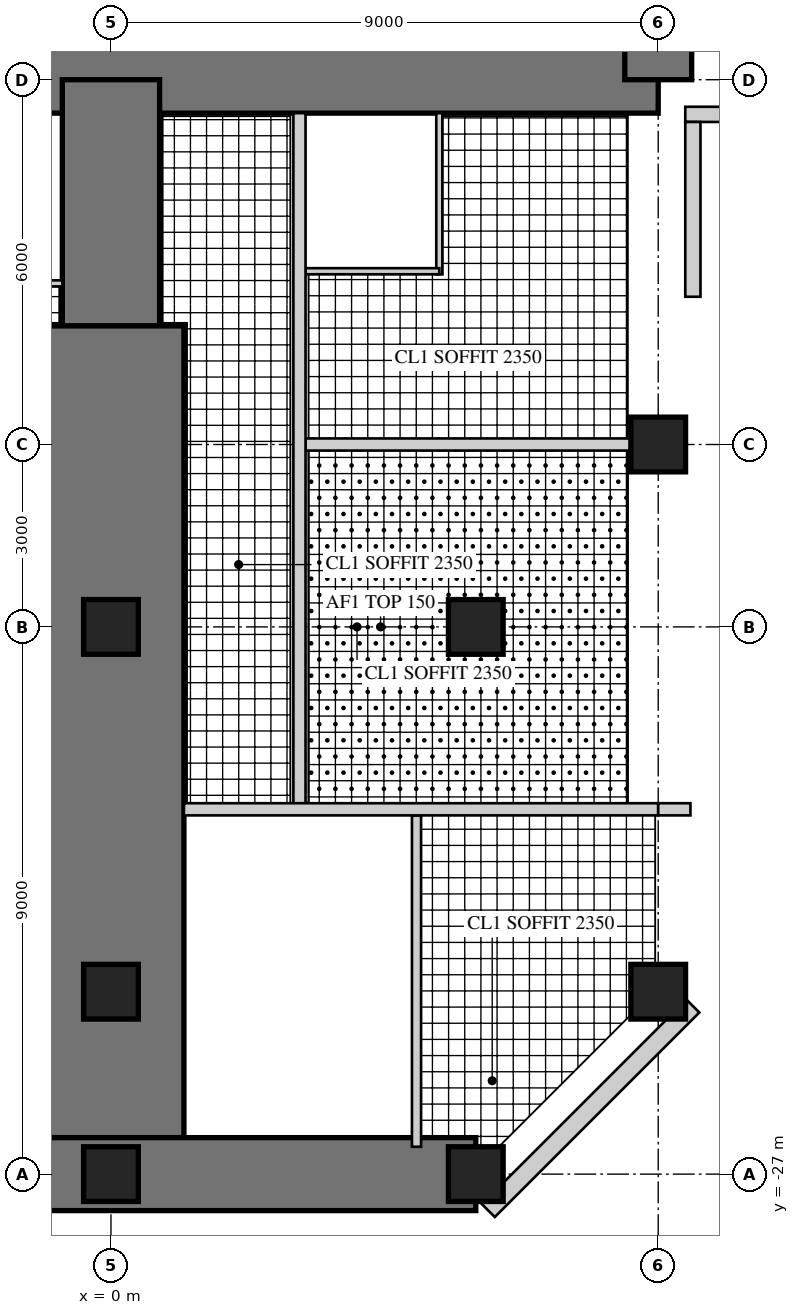
"""IFC4 building model, lengths in metres.
Left out: names, types, materials, properties, quantities, classifications, styles, units other than length and angle.
Written with IfcOpenShell. Run it as: python <this file> out.ifc"""

import sys

from ifc_helpers import new_model, si_unit, direction, frame, frame_2d, origin, origin_2d, place, context, subcontext, project, spatial, rectangle, hollow_rectangle, extrude, element, fill, save


model = new_model("IFC4")
c1 = context("Model", 3, precision=1e-05, world=origin(), true_north=direction((0.0, 1.0)))
c2 = subcontext(c1, "Body", "Model", "MODEL_VIEW")
j1 = project(units=[si_unit("LENGTHUNIT", "METRE"), si_unit("PLANEANGLEUNIT", "RADIAN")], contexts=[c1])
p1 = place(None, origin())
s1 = spatial("IfcSite", under=j1, at=p1, CompositionType="ELEMENT")
p2 = place(p1, origin())
s2 = spatial("IfcBuilding", under=s1, at=p2, CompositionType="ELEMENT")
p3 = place(p2, frame((0.0, 0.0, 206.9)))
s3 = spatial("IfcBuildingStorey", under=s2, at=p3, CompositionType="ELEMENT", Elevation=206.9)
p4 = place(p3, frame((-9.0, -9.0, 0.0), z_axis=(0.0, 0.0, 1.0), x_axis=(1.0, 0.0, 0.0)))
e1 = element("IfcWall", 1, at=p4, inside=s3, PredefinedType="SHEAR", context=c2, shape_type="SweptSolid", body=[
    extrude(rectangle(XDim=18.0, YDim=1.1, at=frame_2d((9.0, 0.0))), origin(), (0.0, 0.0, 1.0), 3.4),
])
p5 = place(p4, frame((9.8, 0.0, 0.0)))
e2 = element("IfcOpeningElement", 2, at=p5, cuts=e1, PredefinedType="OPENING", context=c2, shape_type="SweptSolid", body=[
    extrude(rectangle(XDim=1.0, YDim=2.4, at=frame_2d((0.5, 1.2))), frame((0.0, 0.56, 0.0), z_axis=(0.0, -1.0, 0.0), x_axis=(1.0, 0.0, 0.0)), (0.0, 0.0, 1.0), 1.12),
])
p6 = place(p3, frame((9.0, -9.0, 0.0), z_axis=(0.0, 0.0, 1.0), x_axis=(0.0, 1.0, 0.0)))
e3 = element("IfcWall", 3, at=p6, inside=s3, PredefinedType="SHEAR", context=c2, shape_type="SweptSolid", body=[
    extrude(rectangle(XDim=18.0, YDim=1.1, at=frame_2d((9.0, 0.0))), origin(), (0.0, 0.0, 1.0), 3.4),
])
p7 = place(p6, frame((9.8, 0.0, 0.0)))
e4 = element("IfcOpeningElement", 4, at=p7, cuts=e3, PredefinedType="OPENING", context=c2, shape_type="SweptSolid", body=[
    extrude(rectangle(XDim=1.0, YDim=2.4, at=frame_2d((0.5, 1.2))), frame((0.0, 0.56, 0.0), z_axis=(0.0, -1.0, 0.0), x_axis=(1.0, 0.0, 0.0)), (0.0, 0.0, 1.0), 1.12),
])
p8 = place(p3, frame((0.0, -9.0, 0.0), z_axis=(0.0, 0.0, 1.0), x_axis=(0.0, -1.0, 0.0)))
e5 = element("IfcWall", 5, at=p8, inside=s3, PredefinedType="SHEAR", context=c2, shape_type="SweptSolid", body=[
    extrude(rectangle(XDim=4.05, YDim=1.6, at=frame_2d((2.025, 0.0))), origin(), (0.0, 0.0, 1.0), 3.4),
])
p9 = place(p3, frame((0.0, -13.05, 0.0), z_axis=(0.0, 0.0, 1.0), x_axis=(0.0, -1.0, 0.0)))
e6 = element("IfcWall", 6, at=p9, inside=s3, PredefinedType="SHEAR", context=c2, shape_type="SweptSolid", body=[
    extrude(rectangle(XDim=13.95, YDim=2.4, at=frame_2d((6.975, 0.0))), origin(), (0.0, 0.0, 1.0), 3.4),
])
p10 = place(p9, frame((0.3, 0.0, 0.0)))
e7 = element("IfcOpeningElement", 7, at=p10, cuts=e6, PredefinedType="OPENING", context=c2, shape_type="SweptSolid", body=[
    extrude(rectangle(XDim=1.0, YDim=2.15, at=frame_2d((0.5, 1.075))), frame((0.0, 1.21, 0.0), z_axis=(0.0, -1.0, 0.0), x_axis=(1.0, 0.0, 0.0)), (0.0, 0.0, 1.0), 2.42),
])
p11 = place(p9, frame((2.55, 0.0, 0.0)))
e8 = element("IfcOpeningElement", 8, at=p11, cuts=e6, PredefinedType="OPENING", context=c2, shape_type="SweptSolid", body=[
    extrude(rectangle(XDim=1.0, YDim=2.15, at=frame_2d((0.5, 1.075))), frame((0.0, 1.21, 0.0), z_axis=(0.0, -1.0, 0.0), x_axis=(1.0, 0.0, 0.0)), (0.0, 0.0, 1.0), 2.42),
])
p12 = place(p9, frame((9.2, 0.0, 0.0)))
e9 = element("IfcOpeningElement", 9, at=p12, cuts=e6, PredefinedType="OPENING", context=c2, shape_type="SweptSolid", body=[
    extrude(rectangle(XDim=1.0, YDim=2.2, at=frame_2d((0.5, 1.1))), frame((0.0, 1.21, 0.0), z_axis=(0.0, -1.0, 0.0), x_axis=(1.0, 0.0, 0.0)), (0.0, 0.0, 1.0), 2.42),
])
p13 = place(p3, frame((-6.0, -27.0, 0.0), z_axis=(0.0, 0.0, 1.0), x_axis=(1.0, 0.0, 0.0)))
e10 = element("IfcWall", 10, at=p13, inside=s3, PredefinedType="SHEAR", context=c2, shape_type="SweptSolid", body=[
    extrude(rectangle(XDim=12.0, YDim=1.2, at=frame_2d((6.0, 0.0))), origin(), (0.0, 0.0, 1.0), 3.4),
])
p14 = place(p13, frame((1.225, 0.0, 0.6)))
e11 = element("IfcOpeningElement", 11, at=p14, cuts=e10, PredefinedType="OPENING", context=c2, shape_type="SweptSolid", body=[
    extrude(rectangle(XDim=3.0, YDim=2.4, at=frame_2d((1.5, 1.2))), frame((0.0, 0.61, 0.0), z_axis=(0.0, -1.0, 0.0), x_axis=(1.0, 0.0, 0.0)), (0.0, 0.0, 1.0), 1.22),
])
p15 = place(p13, frame((7.775, 0.0, 0.6)))
e12 = element("IfcOpeningElement", 12, at=p15, cuts=e10, PredefinedType="OPENING", context=c2, shape_type="SweptSolid", body=[
    extrude(rectangle(XDim=3.0, YDim=2.4, at=frame_2d((1.5, 1.2))), frame((0.0, 0.61, 0.0), z_axis=(0.0, -1.0, 0.0), x_axis=(1.0, 0.0, 0.0)), (0.0, 0.0, 1.0), 1.22),
])
for number, where, z_axis, x_axis in (
    (13, (9.0, -15.0, 0.0), (0.0, 0.0, 1.0), (1.0, 0.0, 0.0)),
    (14, (9.0, -24.0, 0.0), (0.0, 0.0, 1.0), (1.0, 0.0, 0.0)),
    (15, (0.0, -27.0, 0.0), (0.0, 0.0, 1.0), (1.0, 0.0, 0.0)),
    (16, (6.0, -27.0, 0.0), (0.0, 0.0, 1.0), (1.0, 0.0, 0.0)),
    (17, (0.0, -18.0, 0.0), (0.0, 0.0, 1.0), (1.0, 0.0, 0.0)),
    (18, (6.0, -18.0, 0.0), (0.0, 0.0, 1.0), (1.0, 0.0, 0.0)),
    (19, (0.0, -24.0, 0.0), (0.0, 0.0, 1.0), (1.0, 0.0, 0.0)),
):
    element("IfcColumn", number, at=place(p3, frame(where, z_axis=z_axis, x_axis=x_axis)), inside=s3, PredefinedType="COLUMN", context=c2, shape_type="SweptSolid", body=[
        extrude(rectangle(XDim=0.9, YDim=0.9, at=origin_2d()), origin(), (0.0, 0.0, 1.0), 3.4),
    ])
p16 = place(p3, frame((9.445, -9.57, 0.0), z_axis=(0.0, 0.0, 1.0), x_axis=(1.0, 0.0, 0.0)))
e20 = element("IfcWall", 20, at=p16, inside=s3, PredefinedType="SOLIDWALL", context=c2, shape_type="SweptSolid", body=[
    extrude(rectangle(XDim=3.125, YDim=0.25, at=frame_2d((1.562, 0.0))), origin(), (0.0, 0.0, 1.0), 3.22),
])
p17 = place(p16, frame((0.6, 0.0, 0.0)))
e21 = element("IfcOpeningElement", 21, at=p17, cuts=e20, PredefinedType="OPENING", context=c2, shape_type="SweptSolid", body=[
    extrude(rectangle(XDim=1.0, YDim=2.2, at=frame_2d((0.5, 1.1))), frame((0.0, 0.135, 0.0), z_axis=(0.0, -1.0, 0.0), x_axis=(1.0, 0.0, 0.0)), (0.0, 0.0, 1.0), 0.27),
])
p18 = place(p3, frame((6.206, -27.6, 0.0), z_axis=(0.0, 0.0, 1.0), x_axis=(0.707106781187, 0.707106781187, 0.0)))
e22 = element("IfcWall", 22, at=p18, inside=s3, PredefinedType="SOLIDWALL", context=c2, shape_type="SweptSolid", body=[
    extrude(rectangle(XDim=4.757, YDim=0.3, at=frame_2d((2.379, 0.0))), origin(), (0.0, 0.0, 1.0), 3.22),
])
p19 = place(p18, frame((1.929, 0.0, 0.3)))
e23 = element("IfcOpeningElement", 23, at=p19, cuts=e22, PredefinedType="OPENING", context=c2, shape_type="SweptSolid", body=[
    extrude(rectangle(XDim=0.9, YDim=2.4, at=frame_2d((0.45, 1.2))), frame((0.0, 0.16, 0.0), z_axis=(0.0, -1.0, 0.0), x_axis=(1.0, 0.0, 0.0)), (0.0, 0.0, 1.0), 0.32),
])
p20 = place(p3, frame((9.57, -12.57, 0.0), z_axis=(0.0, 0.0, 1.0), x_axis=(0.0, 1.0, 0.0)))
e24 = element("IfcWall", 24, at=p20, inside=s3, PredefinedType="SOLIDWALL", context=c2, shape_type="SweptSolid", body=[
    extrude(rectangle(XDim=2.875, YDim=0.25, at=frame_2d((1.438, 0.0))), origin(), (0.0, 0.0, 1.0), 3.22),
])
p21 = place(p20, frame((0.6, 0.0, 0.0)))
e25 = element("IfcOpeningElement", 25, at=p21, cuts=e24, PredefinedType="OPENING", context=c2, shape_type="SweptSolid", body=[
    extrude(rectangle(XDim=1.0, YDim=2.2, at=frame_2d((0.5, 1.1))), frame((0.0, 0.135, 0.0), z_axis=(0.0, -1.0, 0.0), x_axis=(1.0, 0.0, 0.0)), (0.0, 0.0, 1.0), 0.27),
])
p22 = place(p3, frame((5.4, -9.55, 0.0), z_axis=(0.0, 0.0, 1.0), x_axis=(0.0, -1.0, 0.0)))
e26 = element("IfcWall", 26, at=p22, inside=s3, PredefinedType="PARTITIONING", context=c2, shape_type="SweptSolid", body=[
    extrude(rectangle(XDim=2.65, YDim=0.1, at=frame_2d((1.325, 0.0))), origin(), (0.0, 0.0, 1.0), 3.22),
])
p23 = place(p3, frame((3.2, -12.15, 0.0), z_axis=(0.0, 0.0, 1.0), x_axis=(1.0, 0.0, 0.0)))
e27 = element("IfcWall", 27, at=p23, inside=s3, PredefinedType="PARTITIONING", context=c2, shape_type="SweptSolid", body=[
    extrude(rectangle(XDim=2.2, YDim=0.1, at=frame_2d((1.1, 0.0))), origin(), (0.0, 0.0, 1.0), 3.22),
])
p24 = place(p23, frame((0.55, 0.0, 0.0)))
e28 = element("IfcOpeningElement", 28, at=p24, cuts=e27, PredefinedType="OPENING", context=c2, shape_type="SweptSolid", body=[
    extrude(rectangle(XDim=0.9, YDim=2.1, at=frame_2d((0.45, 1.05))), frame((0.0, 0.06, 0.0), z_axis=(0.0, -1.0, 0.0), x_axis=(1.0, 0.0, 0.0)), (0.0, 0.0, 1.0), 0.12),
])
p25 = place(p3, frame((-3.8, -12.35, 0.0), z_axis=(0.0, 0.0, 1.0), x_axis=(1.0, 0.0, 0.0)))
e29 = element("IfcWall", 29, at=p25, inside=s3, PredefinedType="PARTITIONING", context=c2, shape_type="SweptSolid", body=[
    extrude(rectangle(XDim=3.0, YDim=0.1, at=frame_2d((1.5, 0.0))), origin(), (0.0, 0.0, 1.0), 3.22),
])
p26 = place(p25, frame((0.55, 0.0, 0.0)))
e30 = element("IfcOpeningElement", 30, at=p26, cuts=e29, PredefinedType="OPENING", context=c2, shape_type="SweptSolid", body=[
    extrude(rectangle(XDim=0.9, YDim=2.1, at=frame_2d((0.45, 1.05))), frame((0.0, 0.06, 0.0), z_axis=(0.0, -1.0, 0.0), x_axis=(1.0, 0.0, 0.0)), (0.0, 0.0, 1.0), 0.12),
])
p27 = place(p3, frame((3.2, -15.0, 0.0), z_axis=(0.0, 0.0, 1.0), x_axis=(1.0, 0.0, 0.0)))
e31 = element("IfcWall", 31, at=p27, inside=s3, PredefinedType="SOLIDWALL", context=c2, shape_type="SweptSolid", body=[
    extrude(rectangle(XDim=5.35, YDim=0.2, at=frame_2d((2.675, 0.0))), origin(), (0.0, 0.0, 1.0), 2.47),
])
p28 = place(p3, frame((3.1, -9.55, 0.0), z_axis=(0.0, 0.0, 1.0), x_axis=(0.0, -1.0, 0.0)))
e32 = element("IfcWall", 32, at=p28, inside=s3, PredefinedType="SOLIDWALL", context=c2, shape_type="SweptSolid", body=[
    extrude(rectangle(XDim=11.45, YDim=0.2, at=frame_2d((5.725, 0.0))), origin(), (0.0, 0.0, 1.0), 3.22),
])
p29 = place(p28, frame((3.4, 0.0, 0.0)))
e33 = element("IfcOpeningElement", 33, at=p29, cuts=e32, PredefinedType="OPENING", context=c2, shape_type="SweptSolid", body=[
    extrude(rectangle(XDim=1.0, YDim=2.15, at=frame_2d((0.5, 1.075))), frame((0.0, 0.11, 0.0), z_axis=(0.0, -1.0, 0.0), x_axis=(1.0, 0.0, 0.0)), (0.0, 0.0, 1.0), 0.22),
])
p30 = place(p28, frame((6.65, 0.0, 0.0)))
e34 = element("IfcOpeningElement", 34, at=p30, cuts=e32, PredefinedType="OPENING", context=c2, shape_type="SweptSolid", body=[
    extrude(rectangle(XDim=1.0, YDim=2.2, at=frame_2d((0.5, 1.1))), frame((0.0, 0.11, 0.0), z_axis=(0.0, -1.0, 0.0), x_axis=(1.0, 0.0, 0.0)), (0.0, 0.0, 1.0), 0.22),
])
p31 = place(p3, frame((5.025, -21.1, 0.0), z_axis=(0.0, 0.0, 1.0), x_axis=(0.0, -1.0, 0.0)))
e35 = element("IfcWall", 35, at=p31, inside=s3, PredefinedType="PARTITIONING", context=c2, shape_type="SweptSolid", body=[
    extrude(rectangle(XDim=5.45, YDim=0.15, at=frame_2d((2.725, 0.0))), origin(), (0.0, 0.0, 1.0), 3.22),
])
p32 = place(p31, frame((0.6, 0.0, 0.0)))
e36 = element("IfcOpeningElement", 36, at=p32, cuts=e35, PredefinedType="OPENING", context=c2, shape_type="SweptSolid", body=[
    extrude(rectangle(XDim=1.0, YDim=2.1, at=frame_2d((0.5, 1.05))), frame((0.0, 0.085, 0.0), z_axis=(0.0, -1.0, 0.0), x_axis=(1.0, 0.0, 0.0)), (0.0, 0.0, 1.0), 0.17),
])
p33 = place(p3, frame((1.2, -21.0, 0.0), z_axis=(0.0, 0.0, 1.0), x_axis=(1.0, 0.0, 0.0)))
e37 = element("IfcWall", 37, at=p33, inside=s3, PredefinedType="SOLIDWALL", context=c2, shape_type="SweptSolid", body=[
    extrude(rectangle(XDim=7.8, YDim=0.2, at=frame_2d((3.9, 0.0))), origin(), (0.0, 0.0, 1.0), 2.62),
])
p34 = place(p33, frame((0.35, 0.0, 0.0)))
e38 = element("IfcOpeningElement", 38, at=p34, cuts=e37, PredefinedType="OPENING", context=c2, shape_type="SweptSolid", body=[
    extrude(rectangle(XDim=1.0, YDim=2.2, at=frame_2d((0.5, 1.1))), frame((0.0, 0.11, 0.0), z_axis=(0.0, -1.0, 0.0), x_axis=(1.0, 0.0, 0.0)), (0.0, 0.0, 1.0), 0.22),
])
p35 = place(p3, frame((9.0, -21.0, 0.0), z_axis=(0.0, 0.0, 1.0), x_axis=(1.0, 0.0, 0.0)))
e39 = element("IfcWall", 39, at=p35, inside=s3, PredefinedType="SOLIDWALL", context=c2, shape_type="SweptSolid", body=[
    extrude(rectangle(XDim=0.53, YDim=0.2, at=frame_2d((0.265, 0.0))), origin(), (0.0, 0.0, 1.0), 3.22),
])
p36 = place(p15, origin())
e40 = element("IfcWindow", 40, at=p36, inside=s3, PartitioningType="SINGLE_PANEL", PredefinedType="WINDOW", context=c2, shape_type="SweptSolid", body=[
    extrude(hollow_rectangle(XDim=3.0, YDim=2.4, WallThickness=0.06, at=frame_2d((1.5, 1.2))), frame((0.0, 0.03, 0.0), z_axis=(0.0, -1.0, 0.0), x_axis=(1.0, 0.0, 0.0)), (0.0, 0.0, 1.0), 0.06),
    extrude(rectangle(XDim=2.879, YDim=2.279, at=frame_2d((1.5, 1.2))), frame((0.0, 0.03, 0.0), z_axis=(0.0, -1.0, 0.0), x_axis=(1.0, 0.0, 0.0)), (0.0, 0.0, 1.0), 0.06),
])
fill(e12, e40)
p37 = place(p19, origin())
e41 = element("IfcWindow", 41, at=p37, inside=s3, PartitioningType="SINGLE_PANEL", PredefinedType="WINDOW", context=c2, shape_type="SweptSolid", body=[
    extrude(hollow_rectangle(XDim=0.9, YDim=2.4, WallThickness=0.06, at=frame_2d((0.45, 1.2))), frame((0.0, 0.03, 0.0), z_axis=(0.0, -1.0, 0.0), x_axis=(1.0, 0.0, 0.0)), (0.0, 0.0, 1.0), 0.06),
    extrude(rectangle(XDim=0.779, YDim=2.279, at=frame_2d((0.45, 1.2))), frame((0.0, 0.03, 0.0), z_axis=(0.0, -1.0, 0.0), x_axis=(1.0, 0.0, 0.0)), (0.0, 0.0, 1.0), 0.06),
])
fill(e23, e41)
p38 = place(p21, origin())
e42 = element("IfcDoor", 42, at=p38, inside=s3, OperationType="SINGLE_SWING_RIGHT", PredefinedType="DOOR", context=c2, shape_type="SweptSolid", body=[
    extrude(hollow_rectangle(XDim=1.0, YDim=2.2, WallThickness=0.06, at=frame_2d((0.5, 1.1))), frame((0.0, 0.025, 0.0), z_axis=(0.0, -1.0, 0.0), x_axis=(1.0, 0.0, 0.0)), (0.0, 0.0, 1.0), 0.05),
    extrude(rectangle(XDim=0.879, YDim=2.079, at=frame_2d((0.5, 1.1))), frame((0.0, 0.025, 0.0), z_axis=(0.0, -1.0, 0.0), x_axis=(1.0, 0.0, 0.0)), (0.0, 0.0, 1.0), 0.05),
])
fill(e25, e42)
p39 = place(p24, origin())
e43 = element("IfcDoor", 43, at=p39, inside=s3, OperationType="SINGLE_SWING_LEFT", PredefinedType="DOOR", context=c2, shape_type="SweptSolid", body=[
    extrude(rectangle(XDim=0.9, YDim=2.1, at=frame_2d((0.45, 1.05))), frame((0.0, 0.025, 0.0), z_axis=(0.0, -1.0, 0.0), x_axis=(1.0, 0.0, 0.0)), (0.0, 0.0, 1.0), 0.05),
])
fill(e28, e43)
p40 = place(p29, origin())
e44 = element("IfcDoor", 44, at=p40, inside=s3, OperationType="SINGLE_SWING_LEFT", PredefinedType="DOOR", context=c2, shape_type="SweptSolid", body=[
    extrude(rectangle(XDim=1.0, YDim=2.15, at=frame_2d((0.5, 1.075))), frame((0.0, 0.025, 0.0), z_axis=(0.0, -1.0, 0.0), x_axis=(1.0, 0.0, 0.0)), (0.0, 0.0, 1.0), 0.05),
])
fill(e33, e44)
p41 = place(p30, origin())
e45 = element("IfcDoor", 45, at=p41, inside=s3, OperationType="SINGLE_SWING_LEFT", PredefinedType="DOOR", context=c2, shape_type="SweptSolid", body=[
    extrude(rectangle(XDim=1.0, YDim=2.2, at=frame_2d((0.5, 1.1))), frame((0.0, 0.025, 0.0), z_axis=(0.0, -1.0, 0.0), x_axis=(1.0, 0.0, 0.0)), (0.0, 0.0, 1.0), 0.05),
])
fill(e34, e45)
p42 = place(p32, origin())
e46 = element("IfcDoor", 46, at=p42, inside=s3, OperationType="SINGLE_SWING_LEFT", PredefinedType="DOOR", context=c2, shape_type="SweptSolid", body=[
    extrude(rectangle(XDim=1.0, YDim=2.1, at=frame_2d((0.5, 1.05))), frame((0.0, 0.025, 0.0), z_axis=(0.0, -1.0, 0.0), x_axis=(1.0, 0.0, 0.0)), (0.0, 0.0, 1.0), 0.05),
])
fill(e36, e46)
p43 = place(p34, frame((1.0, 0.0, 0.0), z_axis=(0.0, 0.0, 1.0), x_axis=(-1.0, 0.0, 0.0)))
e47 = element("IfcDoor", 47, at=p43, inside=s3, OperationType="SINGLE_SWING_RIGHT", PredefinedType="DOOR", context=c2, shape_type="SweptSolid", body=[
    extrude(rectangle(XDim=1.0, YDim=2.2, at=frame_2d((0.5, 1.1))), frame((0.0, 0.025, 0.0), z_axis=(0.0, -1.0, 0.0), x_axis=(1.0, 0.0, 0.0)), (0.0, 0.0, 1.0), 0.05),
])
fill(e38, e47)
p44 = place(p10, frame((1.0, 0.0, 0.0), z_axis=(0.0, 0.0, 1.0), x_axis=(-1.0, 0.0, 0.0)))
e48 = element("IfcDoor", 48, at=p44, inside=s3, OperationType="SINGLE_SWING_LEFT", PredefinedType="DOOR", context=c2, shape_type="SweptSolid", body=[
    extrude(rectangle(XDim=1.0, YDim=2.15, at=frame_2d((0.5, 1.075))), frame((0.0, 0.025, 0.0), z_axis=(0.0, -1.0, 0.0), x_axis=(1.0, 0.0, 0.0)), (0.0, 0.0, 1.0), 0.05),
])
fill(e7, e48)
p45 = place(p11, frame((1.0, 0.0, 0.0), z_axis=(0.0, 0.0, 1.0), x_axis=(-1.0, 0.0, 0.0)))
e49 = element("IfcDoor", 49, at=p45, inside=s3, OperationType="SINGLE_SWING_RIGHT", PredefinedType="DOOR", context=c2, shape_type="SweptSolid", body=[
    extrude(rectangle(XDim=1.0, YDim=2.15, at=frame_2d((0.5, 1.075))), frame((0.0, 0.025, 0.0), z_axis=(0.0, -1.0, 0.0), x_axis=(1.0, 0.0, 0.0)), (0.0, 0.0, 1.0), 0.05),
])
fill(e8, e49)
p46 = place(p12, origin())
e50 = element("IfcDoor", 50, at=p46, inside=s3, OperationType="SINGLE_SWING_LEFT", PredefinedType="DOOR", context=c2, shape_type="SweptSolid", body=[
    extrude(rectangle(XDim=1.0, YDim=2.2, at=frame_2d((0.5, 1.1))), frame((0.0, 0.025, 0.0), z_axis=(0.0, -1.0, 0.0), x_axis=(1.0, 0.0, 0.0)), (0.0, 0.0, 1.0), 0.05),
])
fill(e9, e50)
p47 = place(p5, origin())
e51 = element("IfcDoor", 51, at=p47, inside=s3, OperationType="SINGLE_SWING_RIGHT", PredefinedType="DOOR", context=c2, shape_type="SweptSolid", body=[
    extrude(rectangle(XDim=1.0, YDim=2.4, at=frame_2d((0.5, 1.2))), frame((0.0, 0.055, 0.0), z_axis=(0.0, -1.0, 0.0), x_axis=(1.0, 0.0, 0.0)), (0.0, 0.0, 1.0), 0.05),
])
fill(e2, e51)
save(model, sys.argv[1])
